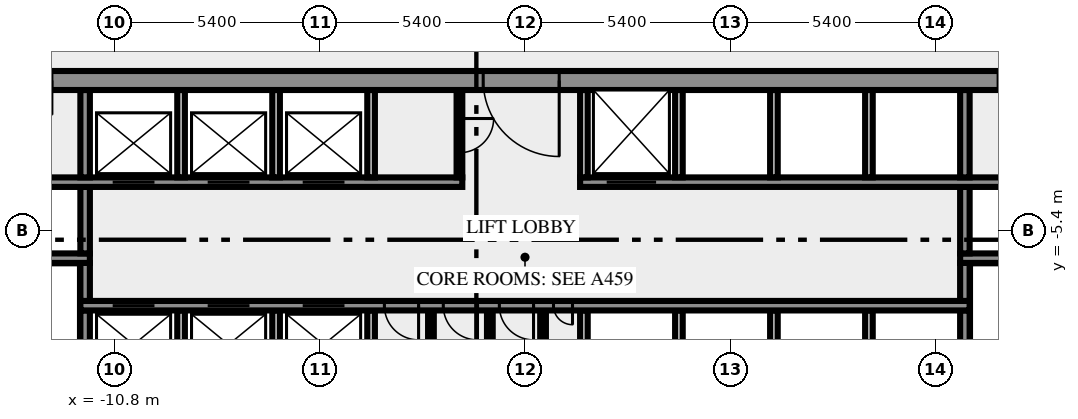
"""IFC4 building model, lengths in metres.
Left out: names, types, materials, properties, quantities, classifications, styles, units other than length and angle.
Written with IfcOpenShell. Run it as: python <this file> out.ifc"""

import sys

from ifc_helpers import new_model, si_unit, direction, frame, frame_2d, origin, place, context, subcontext, project, spatial, rectangle, extrude, element, fill, save


model = new_model("IFC4")
c1 = context("Model", 3, precision=1e-05, world=origin(), true_north=direction((0.0, 1.0)))
c2 = subcontext(c1, "Body", "Model", "MODEL_VIEW")
j1 = project(units=[si_unit("LENGTHUNIT", "METRE"), si_unit("PLANEANGLEUNIT", "RADIAN")], contexts=[c1])
p1 = place(None, origin())
s1 = spatial("IfcSite", under=j1, at=p1, CompositionType="ELEMENT")
p2 = place(p1, origin())
s2 = spatial("IfcBuilding", under=s1, at=p2, CompositionType="ELEMENT")
p3 = place(p2, frame((0.0, 0.0, 63.0)))
s3 = spatial("IfcBuildingStorey", under=s2, at=p3, CompositionType="ELEMENT", Elevation=63.0)
p4 = place(p3, frame((-11.575, -10.5, 0.0), z_axis=(0.0, 0.0, 1.0), x_axis=(0.0, 1.0, 0.0)))
e1 = element("IfcWall", 1, at=p4, inside=s3, PredefinedType="SHEAR", context=c2, shape_type="SweptSolid", body=[
    extrude(rectangle(XDim=3.0, YDim=0.25, at=frame_2d((1.5, 0.0))), origin(), (0.0, 0.0, 1.0), 3.65),
])
for number, where, z_axis, x_axis in (
    (2, (-9.05, -10.5, 0.0), (0.0, 0.0, 1.0), (0.0, 1.0, 0.0)),
    (3, (-6.55, -10.5, 0.0), (0.0, 0.0, 1.0), (0.0, 1.0, 0.0)),
    (4, (-4.05, -10.5, 0.0), (0.0, 0.0, 1.0), (0.0, 1.0, 0.0)),
):
    element("IfcWall", number, at=place(p3, frame(where, z_axis=z_axis, x_axis=x_axis)), inside=s3, PredefinedType="SOLIDWALL", context=c2, shape_type="SweptSolid", body=[
        extrude(rectangle(XDim=3.0, YDim=0.2, at=frame_2d((1.5, 0.0))), origin(), (0.0, 0.0, 1.0), 3.65),
    ])
for number, where, z_axis, x_axis in (
    (5, (-2.475, -10.5, 0.0), (0.0, 0.0, 1.0), (0.0, 1.0, 0.0)),
    (6, (-0.925, -10.5, 0.0), (0.0, 0.0, 1.0), (0.0, 1.0, 0.0)),
    (7, (0.475, -10.5, 0.0), (0.0, 0.0, 1.0), (0.0, 1.0, 0.0)),
):
    element("IfcWall", number, at=place(p3, frame(where, z_axis=z_axis, x_axis=x_axis)), inside=s3, PredefinedType="PARTITIONING", context=c2, shape_type="SweptSolid", body=[
        extrude(rectangle(XDim=3.0, YDim=0.15, at=frame_2d((1.5, 0.0))), origin(), (0.0, 0.0, 1.0), 3.65),
    ])
for number, where, z_axis, x_axis in (
    (8, (1.55, -10.5, 0.0), (0.0, 0.0, 1.0), (0.0, 1.0, 0.0)),
    (9, (4.05, -10.5, 0.0), (0.0, 0.0, 1.0), (0.0, 1.0, 0.0)),
    (10, (6.55, -10.5, 0.0), (0.0, 0.0, 1.0), (0.0, 1.0, 0.0)),
    (11, (9.05, -10.5, 0.0), (0.0, 0.0, 1.0), (0.0, 1.0, 0.0)),
):
    element("IfcWall", number, at=place(p3, frame(where, z_axis=z_axis, x_axis=x_axis)), inside=s3, PredefinedType="SOLIDWALL", context=c2, shape_type="SweptSolid", body=[
        extrude(rectangle(XDim=3.0, YDim=0.2, at=frame_2d((1.5, 0.0))), origin(), (0.0, 0.0, 1.0), 3.65),
    ])
p5 = place(p3, frame((11.575, -10.5, 0.0), z_axis=(0.0, 0.0, 1.0), x_axis=(0.0, 1.0, 0.0)))
e12 = element("IfcWall", 12, at=p5, inside=s3, PredefinedType="SHEAR", context=c2, shape_type="SweptSolid", body=[
    extrude(rectangle(XDim=3.0, YDim=0.25, at=frame_2d((1.5, 0.0))), origin(), (0.0, 0.0, 1.0), 3.65),
])
p6 = place(p3, frame((11.7, -7.375, 0.0), z_axis=(0.0, 0.0, 1.0), x_axis=(-1.0, 0.0, 0.0)))
e13 = element("IfcWall", 13, at=p6, inside=s3, PredefinedType="SHEAR", context=c2, shape_type="SweptSolid", body=[
    extrude(rectangle(XDim=23.4, YDim=0.25, at=frame_2d((11.7, 0.0))), origin(), (0.0, 0.0, 1.0), 3.65),
])
p7 = place(p6, frame((21.45, 0.0, 0.0)))
e14 = element("IfcOpeningElement", 14, at=p7, cuts=e13, PredefinedType="OPENING", context=c2, shape_type="SweptSolid", body=[
    extrude(rectangle(XDim=1.1, YDim=2.1, at=frame_2d((0.55, 1.05))), frame((0.0, 0.135, 0.0), z_axis=(0.0, -1.0, 0.0), x_axis=(1.0, 0.0, 0.0)), (0.0, 0.0, 1.0), 0.27),
])
p8 = place(p6, frame((18.95, 0.0, 0.0)))
e15 = element("IfcOpeningElement", 15, at=p8, cuts=e13, PredefinedType="OPENING", context=c2, shape_type="SweptSolid", body=[
    extrude(rectangle(XDim=1.1, YDim=2.1, at=frame_2d((0.55, 1.05))), frame((0.0, 0.135, 0.0), z_axis=(0.0, -1.0, 0.0), x_axis=(1.0, 0.0, 0.0)), (0.0, 0.0, 1.0), 0.27),
])
p9 = place(p6, frame((16.45, 0.0, 0.0)))
e16 = element("IfcOpeningElement", 16, at=p9, cuts=e13, PredefinedType="OPENING", context=c2, shape_type="SweptSolid", body=[
    extrude(rectangle(XDim=1.1, YDim=2.1, at=frame_2d((0.55, 1.05))), frame((0.0, 0.135, 0.0), z_axis=(0.0, -1.0, 0.0), x_axis=(1.0, 0.0, 0.0)), (0.0, 0.0, 1.0), 0.27),
])
p10 = place(p6, frame((14.5, 0.0, 0.0)))
e17 = element("IfcOpeningElement", 17, at=p10, cuts=e13, PredefinedType="OPENING", context=c2, shape_type="SweptSolid", body=[
    extrude(rectangle(XDim=0.9, YDim=2.1, at=frame_2d((0.45, 1.05))), frame((0.0, 0.135, 0.0), z_axis=(0.0, -1.0, 0.0), x_axis=(1.0, 0.0, 0.0)), (0.0, 0.0, 1.0), 0.27),
])
p11 = place(p6, frame((12.95, 0.0, 0.0)))
e18 = element("IfcOpeningElement", 18, at=p11, cuts=e13, PredefinedType="OPENING", context=c2, shape_type="SweptSolid", body=[
    extrude(rectangle(XDim=0.9, YDim=2.1, at=frame_2d((0.45, 1.05))), frame((0.0, 0.135, 0.0), z_axis=(0.0, -1.0, 0.0), x_axis=(1.0, 0.0, 0.0)), (0.0, 0.0, 1.0), 0.27),
])
p12 = place(p6, frame((11.475, 0.0, 0.0)))
e19 = element("IfcOpeningElement", 19, at=p12, cuts=e13, PredefinedType="OPENING", context=c2, shape_type="SweptSolid", body=[
    extrude(rectangle(XDim=0.9, YDim=2.1, at=frame_2d((0.45, 1.05))), frame((0.0, 0.135, 0.0), z_axis=(0.0, -1.0, 0.0), x_axis=(1.0, 0.0, 0.0)), (0.0, 0.0, 1.0), 0.27),
])
p13 = place(p6, frame((10.45, 0.0, 0.0)))
e20 = element("IfcOpeningElement", 20, at=p13, cuts=e13, PredefinedType="OPENING", context=c2, shape_type="SweptSolid", body=[
    extrude(rectangle(XDim=0.5, YDim=2.1, at=frame_2d((0.25, 1.05))), frame((0.0, 0.135, 0.0), z_axis=(0.0, -1.0, 0.0), x_axis=(1.0, 0.0, 0.0)), (0.0, 0.0, 1.0), 0.27),
])
for number, where, z_axis, x_axis in (
    (21, (-11.575, -7.25, 0.0), (0.0, 0.0, 1.0), (0.0, 1.0, 0.0)),
    (22, (11.575, -7.25, 0.0), (0.0, 0.0, 1.0), (0.0, 1.0, 0.0)),
):
    element("IfcWall", number, at=place(p3, frame(where, z_axis=z_axis, x_axis=x_axis)), inside=s3, PredefinedType="SHEAR", context=c2, shape_type="SweptSolid", body=[
        extrude(rectangle(XDim=1.0, YDim=0.25, at=frame_2d((0.5, 0.0))), origin(), (0.0, 0.0, 1.0), 3.65),
    ])
p14 = place(p3, frame((-11.45, -6.125, 0.0), z_axis=(0.0, 0.0, 1.0), x_axis=(-1.0, 0.0, 0.0)))
e23 = element("IfcWall", 23, at=p14, inside=s3, PredefinedType="SHEAR", context=c2, shape_type="SweptSolid", body=[
    extrude(rectangle(XDim=8.05, YDim=0.25, at=frame_2d((4.025, 0.0))), origin(), (0.0, 0.0, 1.0), 3.65),
])
p15 = place(p14, frame((6.2, 0.0, 0.0)))
e24 = element("IfcOpeningElement", 24, at=p15, cuts=e23, PredefinedType="OPENING", context=c2, shape_type="SweptSolid", body=[
    extrude(rectangle(XDim=1.8, YDim=2.1, at=frame_2d((0.9, 1.05))), frame((0.0, 0.135, 0.0), z_axis=(0.0, -1.0, 0.0), x_axis=(1.0, 0.0, 0.0)), (0.0, 0.0, 1.0), 0.27),
])
p16 = place(p3, frame((19.5, -6.125, 0.0), z_axis=(0.0, 0.0, 1.0), x_axis=(-1.0, 0.0, 0.0)))
e25 = element("IfcWall", 25, at=p16, inside=s3, PredefinedType="SHEAR", context=c2, shape_type="SweptSolid", body=[
    extrude(rectangle(XDim=8.05, YDim=0.25, at=frame_2d((4.025, 0.0))), origin(), (0.0, 0.0, 1.0), 3.65),
])
p17 = place(p16, frame((0.05, 0.0, 0.0)))
e26 = element("IfcOpeningElement", 26, at=p17, cuts=e25, PredefinedType="OPENING", context=c2, shape_type="SweptSolid", body=[
    extrude(rectangle(XDim=1.8, YDim=2.1, at=frame_2d((0.9, 1.05))), frame((0.0, 0.135, 0.0), z_axis=(0.0, -1.0, 0.0), x_axis=(1.0, 0.0, 0.0)), (0.0, 0.0, 1.0), 0.27),
])
for number, where, z_axis, x_axis in (
    (27, (-11.575, -6.0, 0.0), (0.0, 0.0, 1.0), (0.0, 1.0, 0.0)),
    (28, (11.575, -6.0, 0.0), (0.0, 0.0, 1.0), (0.0, 1.0, 0.0)),
):
    element("IfcWall", number, at=place(p3, frame(where, z_axis=z_axis, x_axis=x_axis)), inside=s3, PredefinedType="SHEAR", context=c2, shape_type="SweptSolid", body=[
        extrude(rectangle(XDim=1.75, YDim=0.25, at=frame_2d((0.875, 0.0))), origin(), (0.0, 0.0, 1.0), 3.65),
    ])
p18 = place(p3, frame((-14.35, -4.125, 0.0), z_axis=(0.0, 0.0, 1.0), x_axis=(1.0, 0.0, 0.0)))
e29 = element("IfcWall", 29, at=p18, inside=s3, PredefinedType="SHEAR", context=c2, shape_type="SweptSolid", body=[
    extrude(rectangle(XDim=12.7, YDim=0.25, at=frame_2d((6.35, 0.0))), origin(), (0.0, 0.0, 1.0), 3.65),
])
p19 = place(p18, frame((3.5, 0.0, 0.0)))
e30 = element("IfcOpeningElement", 30, at=p19, cuts=e29, PredefinedType="OPENING", context=c2, shape_type="SweptSolid", body=[
    extrude(rectangle(XDim=1.1, YDim=2.1, at=frame_2d((0.55, 1.05))), frame((0.0, 0.135, 0.0), z_axis=(0.0, -1.0, 0.0), x_axis=(1.0, 0.0, 0.0)), (0.0, 0.0, 1.0), 0.27),
])
p20 = place(p18, frame((6.0, 0.0, 0.0)))
e31 = element("IfcOpeningElement", 31, at=p20, cuts=e29, PredefinedType="OPENING", context=c2, shape_type="SweptSolid", body=[
    extrude(rectangle(XDim=1.1, YDim=2.1, at=frame_2d((0.55, 1.05))), frame((0.0, 0.135, 0.0), z_axis=(0.0, -1.0, 0.0), x_axis=(1.0, 0.0, 0.0)), (0.0, 0.0, 1.0), 0.27),
])
p21 = place(p18, frame((8.5, 0.0, 0.0)))
e32 = element("IfcOpeningElement", 32, at=p21, cuts=e29, PredefinedType="OPENING", context=c2, shape_type="SweptSolid", body=[
    extrude(rectangle(XDim=1.1, YDim=2.1, at=frame_2d((0.55, 1.05))), frame((0.0, 0.135, 0.0), z_axis=(0.0, -1.0, 0.0), x_axis=(1.0, 0.0, 0.0)), (0.0, 0.0, 1.0), 0.27),
])
p22 = place(p3, frame((1.45, -4.125, 0.0), z_axis=(0.0, 0.0, 1.0), x_axis=(1.0, 0.0, 0.0)))
e33 = element("IfcWall", 33, at=p22, inside=s3, PredefinedType="SHEAR", context=c2, shape_type="SweptSolid", body=[
    extrude(rectangle(XDim=12.9, YDim=0.25, at=frame_2d((6.45, 0.0))), origin(), (0.0, 0.0, 1.0), 3.65),
])
p23 = place(p22, frame((0.7, 0.0, 0.0)))
e34 = element("IfcOpeningElement", 34, at=p23, cuts=e33, PredefinedType="OPENING", context=c2, shape_type="SweptSolid", body=[
    extrude(rectangle(XDim=1.3, YDim=2.1, at=frame_2d((0.65, 1.05))), frame((0.0, 0.135, 0.0), z_axis=(0.0, -1.0, 0.0), x_axis=(1.0, 0.0, 0.0)), (0.0, 0.0, 1.0), 0.27),
])
p24 = place(p3, frame((-11.575, -4.0, 0.0), z_axis=(0.0, 0.0, 1.0), x_axis=(0.0, 1.0, 0.0)))
e35 = element("IfcWall", 35, at=p24, inside=s3, PredefinedType="SHEAR", context=c2, shape_type="SweptSolid", body=[
    extrude(rectangle(XDim=2.3, YDim=0.25, at=frame_2d((1.15, 0.0))), origin(), (0.0, 0.0, 1.0), 3.65),
])
for number, where, z_axis, x_axis in (
    (36, (-9.05, -4.0, 0.0), (0.0, 0.0, 1.0), (0.0, 1.0, 0.0)),
    (37, (-6.55, -4.0, 0.0), (0.0, 0.0, 1.0), (0.0, 1.0, 0.0)),
    (38, (-4.05, -4.0, 0.0), (0.0, 0.0, 1.0), (0.0, 1.0, 0.0)),
):
    element("IfcWall", number, at=place(p3, frame(where, z_axis=z_axis, x_axis=x_axis)), inside=s3, PredefinedType="SOLIDWALL", context=c2, shape_type="SweptSolid", body=[
        extrude(rectangle(XDim=2.3, YDim=0.2, at=frame_2d((1.15, 0.0))), origin(), (0.0, 0.0, 1.0), 3.65),
    ])
p25 = place(p3, frame((-1.725, -1.7, 0.0), z_axis=(0.0, 0.0, 1.0), x_axis=(0.0, -1.0, 0.0)))
e39 = element("IfcWall", 39, at=p25, inside=s3, PredefinedType="PARTITIONING", context=c2, shape_type="SweptSolid", body=[
    extrude(rectangle(XDim=2.3, YDim=0.15, at=frame_2d((1.15, 0.0))), origin(), (0.0, 0.0, 1.0), 3.65),
])
p26 = place(p25, frame((0.75, 0.0, 0.0)))
e40 = element("IfcOpeningElement", 40, at=p26, cuts=e39, PredefinedType="OPENING", context=c2, shape_type="SweptSolid", body=[
    extrude(rectangle(XDim=0.9, YDim=2.1, at=frame_2d((0.45, 1.05))), frame((0.0, 0.085, 0.0), z_axis=(0.0, -1.0, 0.0), x_axis=(1.0, 0.0, 0.0)), (0.0, 0.0, 1.0), 0.17),
])
for number, where, z_axis, x_axis in (
    (41, (1.55, -4.0, 0.0), (0.0, 0.0, 1.0), (0.0, 1.0, 0.0)),
    (42, (4.05, -4.0, 0.0), (0.0, 0.0, 1.0), (0.0, 1.0, 0.0)),
    (43, (6.55, -4.0, 0.0), (0.0, 0.0, 1.0), (0.0, 1.0, 0.0)),
    (44, (9.05, -4.0, 0.0), (0.0, 0.0, 1.0), (0.0, 1.0, 0.0)),
):
    element("IfcWall", number, at=place(p3, frame(where, z_axis=z_axis, x_axis=x_axis)), inside=s3, PredefinedType="SOLIDWALL", context=c2, shape_type="SweptSolid", body=[
        extrude(rectangle(XDim=2.3, YDim=0.2, at=frame_2d((1.15, 0.0))), origin(), (0.0, 0.0, 1.0), 3.65),
    ])
p27 = place(p3, frame((11.575, -4.0, 0.0), z_axis=(0.0, 0.0, 1.0), x_axis=(0.0, 1.0, 0.0)))
e45 = element("IfcWall", 45, at=p27, inside=s3, PredefinedType="SHEAR", context=c2, shape_type="SweptSolid", body=[
    extrude(rectangle(XDim=2.3, YDim=0.25, at=frame_2d((1.15, 0.0))), origin(), (0.0, 0.0, 1.0), 3.65),
])
p28 = place(p3, frame((20.49, -1.45, 0.0), z_axis=(0.0, 0.0, 1.0), x_axis=(-1.0, 0.0, 0.0)))
e46 = element("IfcWall", 46, at=p28, inside=s3, PredefinedType="SHEAR", context=c2, shape_type="SweptSolid", body=[
    extrude(rectangle(XDim=40.98, YDim=0.5, at=frame_2d((20.49, 0.0))), origin(), (0.0, 0.0, 1.0), 3.65),
])
p29 = place(p28, frame((38.14, 0.0, 0.0)))
e47 = element("IfcOpeningElement", 47, at=p29, cuts=e46, PredefinedType="OPENING", context=c2, shape_type="SweptSolid", body=[
    extrude(rectangle(XDim=1.8, YDim=2.1, at=frame_2d((0.9, 1.05))), frame((0.0, 0.26, 0.0), z_axis=(0.0, -1.0, 0.0), x_axis=(1.0, 0.0, 0.0)), (0.0, 0.0, 1.0), 0.52),
])
p30 = place(p28, frame((35.89, 0.0, 0.0)))
e48 = element("IfcOpeningElement", 48, at=p30, cuts=e46, PredefinedType="OPENING", context=c2, shape_type="SweptSolid", body=[
    extrude(rectangle(XDim=0.9, YDim=2.1, at=frame_2d((0.45, 1.05))), frame((0.0, 0.26, 0.0), z_axis=(0.0, -1.0, 0.0), x_axis=(1.0, 0.0, 0.0)), (0.0, 0.0, 1.0), 0.52),
])
p31 = place(p28, frame((32.94, 0.0, 0.0)))
e49 = element("IfcOpeningElement", 49, at=p31, cuts=e46, PredefinedType="OPENING", context=c2, shape_type="SweptSolid", body=[
    extrude(rectangle(XDim=0.9, YDim=2.1, at=frame_2d((0.45, 1.05))), frame((0.0, 0.26, 0.0), z_axis=(0.0, -1.0, 0.0), x_axis=(1.0, 0.0, 0.0)), (0.0, 0.0, 1.0), 0.52),
])
p32 = place(p28, frame((19.59, 0.0, 0.0)))
e50 = element("IfcOpeningElement", 50, at=p32, cuts=e46, PredefinedType="OPENING", context=c2, shape_type="SweptSolid", body=[
    extrude(rectangle(XDim=2.0, YDim=2.1, at=frame_2d((1.0, 1.05))), frame((0.0, 0.26, 0.0), z_axis=(0.0, -1.0, 0.0), x_axis=(1.0, 0.0, 0.0)), (0.0, 0.0, 1.0), 0.52),
])
p33 = place(p28, frame((7.14, 0.0, 0.0)))
e51 = element("IfcOpeningElement", 51, at=p33, cuts=e46, PredefinedType="OPENING", context=c2, shape_type="SweptSolid", body=[
    extrude(rectangle(XDim=0.9, YDim=2.1, at=frame_2d((0.45, 1.05))), frame((0.0, 0.26, 0.0), z_axis=(0.0, -1.0, 0.0), x_axis=(1.0, 0.0, 0.0)), (0.0, 0.0, 1.0), 0.52),
])
p34 = place(p28, frame((5.028, 0.0, 0.0)))
e52 = element("IfcOpeningElement", 52, at=p34, cuts=e46, PredefinedType="OPENING", context=c2, shape_type="SweptSolid", body=[
    extrude(rectangle(XDim=0.8, YDim=2.1, at=frame_2d((0.4, 1.05))), frame((0.0, 0.26, 0.0), z_axis=(0.0, -1.0, 0.0), x_axis=(1.0, 0.0, 0.0)), (0.0, 0.0, 1.0), 0.52),
])
p35 = place(p28, frame((3.452, 0.0, 0.0)))
e53 = element("IfcOpeningElement", 53, at=p35, cuts=e46, PredefinedType="OPENING", context=c2, shape_type="SweptSolid", body=[
    extrude(rectangle(XDim=0.8, YDim=2.1, at=frame_2d((0.4, 1.05))), frame((0.0, 0.26, 0.0), z_axis=(0.0, -1.0, 0.0), x_axis=(1.0, 0.0, 0.0)), (0.0, 0.0, 1.0), 0.52),
])
p36 = place(p28, frame((1.04, 0.0, 0.0)))
e54 = element("IfcOpeningElement", 54, at=p36, cuts=e46, PredefinedType="OPENING", context=c2, shape_type="SweptSolid", body=[
    extrude(rectangle(XDim=1.8, YDim=2.1, at=frame_2d((0.9, 1.05))), frame((0.0, 0.26, 0.0), z_axis=(0.0, -1.0, 0.0), x_axis=(1.0, 0.0, 0.0)), (0.0, 0.0, 1.0), 0.52),
])
p37 = place(p7, origin())
e55 = element("IfcDoor", 55, at=p37, inside=s3, OperationType="DOUBLE_DOOR_SLIDING", PredefinedType="DOOR", context=c2, shape_type="SweptSolid", body=[
    extrude(rectangle(XDim=1.1, YDim=2.1, at=frame_2d((0.55, 1.05))), frame((0.0, 0.025, 0.0), z_axis=(0.0, -1.0, 0.0), x_axis=(1.0, 0.0, 0.0)), (0.0, 0.0, 1.0), 0.05),
])
fill(e14, e55)
p38 = place(p8, origin())
e56 = element("IfcDoor", 56, at=p38, inside=s3, OperationType="DOUBLE_DOOR_SLIDING", PredefinedType="DOOR", context=c2, shape_type="SweptSolid", body=[
    extrude(rectangle(XDim=1.1, YDim=2.1, at=frame_2d((0.55, 1.05))), frame((0.0, 0.025, 0.0), z_axis=(0.0, -1.0, 0.0), x_axis=(1.0, 0.0, 0.0)), (0.0, 0.0, 1.0), 0.05),
])
fill(e15, e56)
p39 = place(p9, origin())
e57 = element("IfcDoor", 57, at=p39, inside=s3, OperationType="DOUBLE_DOOR_SLIDING", PredefinedType="DOOR", context=c2, shape_type="SweptSolid", body=[
    extrude(rectangle(XDim=1.1, YDim=2.1, at=frame_2d((0.55, 1.05))), frame((0.0, 0.025, 0.0), z_axis=(0.0, -1.0, 0.0), x_axis=(1.0, 0.0, 0.0)), (0.0, 0.0, 1.0), 0.05),
])
fill(e16, e57)
p40 = place(p10, origin())
e58 = element("IfcDoor", 58, at=p40, inside=s3, OperationType="SINGLE_SWING_RIGHT", PredefinedType="DOOR", context=c2, shape_type="SweptSolid", body=[
    extrude(rectangle(XDim=0.9, YDim=2.1, at=frame_2d((0.45, 1.05))), frame((0.0, 0.025, 0.0), z_axis=(0.0, -1.0, 0.0), x_axis=(1.0, 0.0, 0.0)), (0.0, 0.0, 1.0), 0.05),
])
fill(e17, e58)
p41 = place(p11, origin())
e59 = element("IfcDoor", 59, at=p41, inside=s3, OperationType="SINGLE_SWING_RIGHT", PredefinedType="DOOR", context=c2, shape_type="SweptSolid", body=[
    extrude(rectangle(XDim=0.9, YDim=2.1, at=frame_2d((0.45, 1.05))), frame((0.0, 0.025, 0.0), z_axis=(0.0, -1.0, 0.0), x_axis=(1.0, 0.0, 0.0)), (0.0, 0.0, 1.0), 0.05),
])
fill(e18, e59)
p42 = place(p12, origin())
e60 = element("IfcDoor", 60, at=p42, inside=s3, OperationType="SINGLE_SWING_RIGHT", PredefinedType="DOOR", context=c2, shape_type="SweptSolid", body=[
    extrude(rectangle(XDim=0.9, YDim=2.1, at=frame_2d((0.45, 1.05))), frame((0.0, 0.025, 0.0), z_axis=(0.0, -1.0, 0.0), x_axis=(1.0, 0.0, 0.0)), (0.0, 0.0, 1.0), 0.05),
])
fill(e19, e60)
p43 = place(p13, origin())
e61 = element("IfcDoor", 61, at=p43, inside=s3, OperationType="SINGLE_SWING_LEFT", PredefinedType="DOOR", context=c2, shape_type="SweptSolid", body=[
    extrude(rectangle(XDim=0.5, YDim=2.1, at=frame_2d((0.25, 1.05))), frame((0.0, 0.025, 0.0), z_axis=(0.0, -1.0, 0.0), x_axis=(1.0, 0.0, 0.0)), (0.0, 0.0, 1.0), 0.05),
])
fill(e20, e61)
p44 = place(p19, origin())
e62 = element("IfcDoor", 62, at=p44, inside=s3, OperationType="DOUBLE_DOOR_SLIDING", PredefinedType="DOOR", context=c2, shape_type="SweptSolid", body=[
    extrude(rectangle(XDim=1.1, YDim=2.1, at=frame_2d((0.55, 1.05))), frame((0.0, 0.025, 0.0), z_axis=(0.0, -1.0, 0.0), x_axis=(1.0, 0.0, 0.0)), (0.0, 0.0, 1.0), 0.05),
])
fill(e30, e62)
p45 = place(p20, origin())
e63 = element("IfcDoor", 63, at=p45, inside=s3, OperationType="DOUBLE_DOOR_SLIDING", PredefinedType="DOOR", context=c2, shape_type="SweptSolid", body=[
    extrude(rectangle(XDim=1.1, YDim=2.1, at=frame_2d((0.55, 1.05))), frame((0.0, 0.025, 0.0), z_axis=(0.0, -1.0, 0.0), x_axis=(1.0, 0.0, 0.0)), (0.0, 0.0, 1.0), 0.05),
])
fill(e31, e63)
p46 = place(p21, origin())
e64 = element("IfcDoor", 64, at=p46, inside=s3, OperationType="DOUBLE_DOOR_SLIDING", PredefinedType="DOOR", context=c2, shape_type="SweptSolid", body=[
    extrude(rectangle(XDim=1.1, YDim=2.1, at=frame_2d((0.55, 1.05))), frame((0.0, 0.025, 0.0), z_axis=(0.0, -1.0, 0.0), x_axis=(1.0, 0.0, 0.0)), (0.0, 0.0, 1.0), 0.05),
])
fill(e32, e64)
p47 = place(p23, origin())
e65 = element("IfcDoor", 65, at=p47, inside=s3, OperationType="DOUBLE_DOOR_SLIDING", PredefinedType="DOOR", context=c2, shape_type="SweptSolid", body=[
    extrude(rectangle(XDim=1.3, YDim=2.1, at=frame_2d((0.65, 1.05))), frame((0.0, 0.025, 0.0), z_axis=(0.0, -1.0, 0.0), x_axis=(1.0, 0.0, 0.0)), (0.0, 0.0, 1.0), 0.05),
])
fill(e34, e65)
p48 = place(p26, origin())
e66 = element("IfcDoor", 66, at=p48, inside=s3, OperationType="SINGLE_SWING_RIGHT", PredefinedType="DOOR", context=c2, shape_type="SweptSolid", body=[
    extrude(rectangle(XDim=0.9, YDim=2.1, at=frame_2d((0.45, 1.05))), frame((0.0, 0.025, 0.0), z_axis=(0.0, -1.0, 0.0), x_axis=(1.0, 0.0, 0.0)), (0.0, 0.0, 1.0), 0.05),
])
fill(e40, e66)
p49 = place(p32, origin())
e67 = element("IfcDoor", 67, at=p49, inside=s3, OperationType="DOUBLE_DOOR_SINGLE_SWING", PredefinedType="DOOR", context=c2, shape_type="SweptSolid", body=[
    extrude(rectangle(XDim=2.0, YDim=2.1, at=frame_2d((1.0, 1.05))), frame((0.0, 0.025, 0.0), z_axis=(0.0, -1.0, 0.0), x_axis=(1.0, 0.0, 0.0)), (0.0, 0.0, 1.0), 0.05),
])
fill(e50, e67)
save(model, sys.argv[1])
